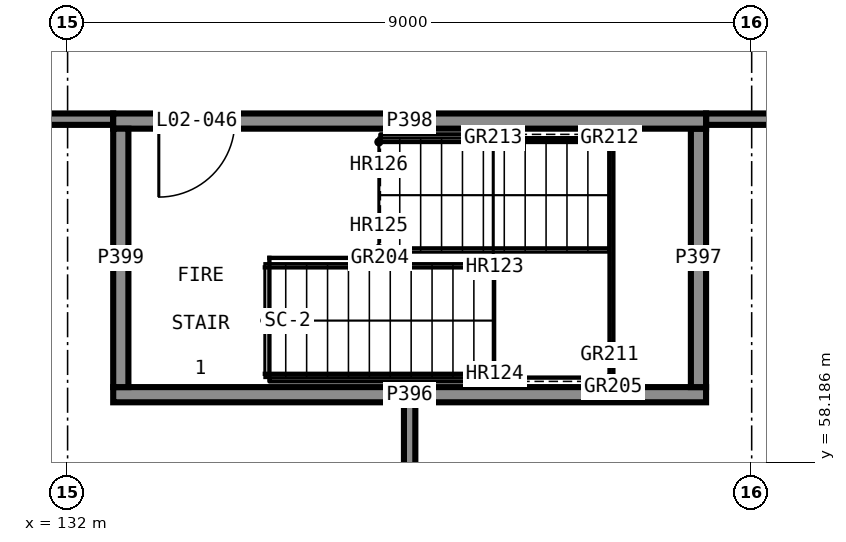
"""IFC4 building model, lengths in metres.
Left out: names, types, materials, properties, quantities, classifications, styles, units other than length and angle.
Written with IfcOpenShell. Run it as: python <this file> out.ifc"""

import sys

from ifc_helpers import new_model, si_unit, direction, frame, frame_2d, origin, place, context, subcontext, project, spatial, rectangle, extrude, element, fill, save


model = new_model("IFC4")
c1 = context("Model", 3, precision=1e-05, world=origin(), true_north=direction((0.0, 1.0)))
c2 = subcontext(c1, "Body", "Model", "MODEL_VIEW")
j1 = project(units=[si_unit("LENGTHUNIT", "METRE"), si_unit("PLANEANGLEUNIT", "RADIAN")], contexts=[c1])
p1 = place(None, origin())
s1 = spatial("IfcSite", under=j1, at=p1, CompositionType="ELEMENT")
p2 = place(p1, origin())
s2 = spatial("IfcBuilding", under=s1, at=p2, CompositionType="ELEMENT")
p3 = place(p2, frame((0.0, 0.0, 9.5)))
s3 = spatial("IfcBuildingStorey", under=s2, at=p3, CompositionType="ELEMENT", Elevation=9.5)
p4 = place(p3, frame((132.6, 59.075, 0.0), z_axis=(0.0, 0.0, 1.0), x_axis=(1.0, 0.0, 0.0)))
e1 = element("IfcWall", 1, at=p4, inside=s3, PredefinedType="SHEAR", context=c2, shape_type="SweptSolid", body=[
    extrude(rectangle(XDim=7.8, YDim=0.2, at=frame_2d((3.9, 0.0))), origin(), (0.0, 0.0, 1.0), 3.75),
])
p5 = place(p3, frame((140.3, 59.175, 0.0), z_axis=(0.0, 0.0, 1.0), x_axis=(0.0, 1.0, 0.0)))
e2 = element("IfcWall", 2, at=p5, inside=s3, PredefinedType="SHEAR", context=c2, shape_type="SweptSolid", body=[
    extrude(rectangle(XDim=3.4, YDim=0.2, at=frame_2d((1.7, 0.0))), origin(), (0.0, 0.0, 1.0), 3.75),
])
p6 = place(p3, frame((140.4, 62.675, 0.0), z_axis=(0.0, 0.0, 1.0), x_axis=(-1.0, 0.0, 0.0)))
e3 = element("IfcWall", 3, at=p6, inside=s3, PredefinedType="SHEAR", context=c2, shape_type="SweptSolid", body=[
    extrude(rectangle(XDim=7.8, YDim=0.2, at=frame_2d((3.9, 0.0))), origin(), (0.0, 0.0, 1.0), 3.75),
])
p7 = place(p6, frame((6.2, 0.0, 0.0)))
e4 = element("IfcOpeningElement", 4, at=p7, cuts=e3, PredefinedType="OPENING", context=c2, shape_type="SweptSolid", body=[
    extrude(rectangle(XDim=1.0, YDim=2.1, at=frame_2d((0.5, 1.05))), frame((0.0, 0.11, 0.0), z_axis=(0.0, -1.0, 0.0), x_axis=(1.0, 0.0, 0.0)), (0.0, 0.0, 1.0), 0.22),
])
p8 = place(p3, frame((132.7, 62.575, 0.0), z_axis=(0.0, 0.0, 1.0), x_axis=(0.0, -1.0, 0.0)))
e5 = element("IfcWall", 5, at=p8, inside=s3, PredefinedType="SHEAR", context=c2, shape_type="SweptSolid", body=[
    extrude(rectangle(XDim=3.4, YDim=0.2, at=frame_2d((1.7, 0.0))), origin(), (0.0, 0.0, 1.0), 3.75),
])
p9 = place(p3, frame((132.6, 62.7, 0.0), z_axis=(0.0, 0.0, 1.0), x_axis=(-1.0, 0.0, 0.0)))
e6 = element("IfcWall", 6, at=p9, inside=s3, PredefinedType="PARTITIONING", context=c2, shape_type="SweptSolid", body=[
    extrude(rectangle(XDim=11.825, YDim=0.15, at=frame_2d((5.913, 0.0))), origin(), (0.0, 0.0, 1.0), 3.75),
])
p10 = place(p9, frame((5.427, 0.0, 0.0)))
e7 = element("IfcOpeningElement", 7, at=p10, cuts=e6, PredefinedType="OPENING", context=c2, shape_type="SweptSolid", body=[
    extrude(rectangle(XDim=1.0, YDim=2.1, at=frame_2d((0.5, 1.05))), frame((0.0, 0.085, 0.0), z_axis=(0.0, -1.0, 0.0), x_axis=(1.0, 0.0, 0.0)), (0.0, 0.0, 1.0), 0.17),
])
p11 = place(p3, frame((143.225, 62.7, 0.0), z_axis=(0.0, 0.0, 1.0), x_axis=(-1.0, 0.0, 0.0)))
e8 = element("IfcWall", 8, at=p11, inside=s3, PredefinedType="PARTITIONING", context=c2, shape_type="SweptSolid", body=[
    extrude(rectangle(XDim=2.825, YDim=0.15, at=frame_2d((1.413, 0.0))), origin(), (0.0, 0.0, 1.0), 3.75),
])
p12 = place(p3, frame((136.5, 50.9, 0.0), z_axis=(0.0, 0.0, 1.0), x_axis=(0.0, 1.0, 0.0)))
e9 = element("IfcWall", 9, at=p12, inside=s3, PredefinedType="PARTITIONING", context=c2, shape_type="SweptSolid", body=[
    extrude(rectangle(XDim=8.075, YDim=0.15, at=frame_2d((4.038, 0.0))), origin(), (0.0, 0.0, 1.0), 3.75),
])
p13 = place(p7, origin())
e10 = element("IfcDoor", 10, at=p13, inside=s3, OperationType="SINGLE_SWING_LEFT", PredefinedType="DOOR", context=c2, shape_type="SweptSolid", body=[
    extrude(rectangle(XDim=1.0, YDim=2.1, at=frame_2d((0.5, 1.05))), frame((0.0, 0.025, 0.0), z_axis=(0.0, -1.0, 0.0), x_axis=(1.0, 0.0, 0.0)), (0.0, 0.0, 1.0), 0.05),
])
fill(e4, e10)
save(model, sys.argv[1])
